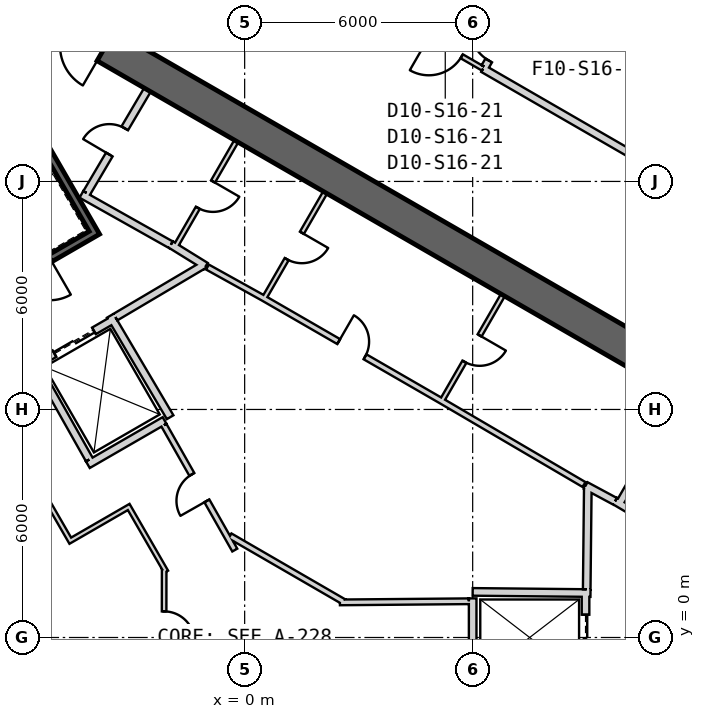
"""IFC4 building model, lengths in metres.
Left out: names, types, materials, properties, quantities, classifications, styles, units other than length and angle.
Written with IfcOpenShell. Run it as: python <this file> out.ifc"""

import sys

from ifc_helpers import new_model, si_unit, direction, frame, frame_2d, origin, place, context, subcontext, project, spatial, rectangle, extrude, element, fill, save


model = new_model("IFC4")
c1 = context("Model", 3, precision=1e-05, world=origin(), true_north=direction((0.0, 1.0)))
c2 = subcontext(c1, "Body", "Model", "MODEL_VIEW")
j1 = project(units=[si_unit("LENGTHUNIT", "METRE"), si_unit("PLANEANGLEUNIT", "RADIAN")], contexts=[c1])
p1 = place(None, origin())
s1 = spatial("IfcSite", under=j1, at=p1, CompositionType="ELEMENT")
p2 = place(p1, origin())
s2 = spatial("IfcBuilding", under=s1, at=p2, CompositionType="ELEMENT")
p3 = place(p2, frame((0.0, 0.0, 253.2)))
s3 = spatial("IfcBuildingStorey", under=s2, at=p3, CompositionType="ELEMENT", Elevation=253.2)
p4 = place(p3, frame((19.475, 2.208, 0.0), z_axis=(0.0, 0.0, 1.0), x_axis=(-0.866028369851, 0.499994862586, 0.0)))
e1 = element("IfcWall", 1, at=p4, inside=s3, PredefinedType="SHEAR", context=c2, shape_type="SweptSolid", body=[
    extrude(rectangle(XDim=31.523, YDim=0.9, at=frame_2d((15.762, 0.0))), origin(), (0.0, 0.0, 1.0), 4.0),
])
p5 = place(p4, frame((7.062, 0.0, 0.0)))
e2 = element("IfcOpeningElement", 2, at=p5, cuts=e1, PredefinedType="OPENING", context=c2, shape_type="SweptSolid", body=[
    extrude(rectangle(XDim=1.2, YDim=2.4, at=frame_2d((0.6, 1.2))), frame((0.0, 0.46, 0.0), z_axis=(0.0, -1.0, 0.0), x_axis=(1.0, 0.0, 0.0)), (0.0, 0.0, 1.0), 0.92),
])
p6 = place(p4, frame((3.612, 0.0, 0.0)))
e3 = element("IfcOpeningElement", 3, at=p6, cuts=e1, PredefinedType="OPENING", context=c2, shape_type="SweptSolid", body=[
    extrude(rectangle(XDim=1.2, YDim=2.4, at=frame_2d((0.6, 1.2))), frame((0.0, 0.46, 0.0), z_axis=(0.0, -1.0, 0.0), x_axis=(1.0, 0.0, 0.0)), (0.0, 0.0, 1.0), 0.92),
])
p7 = place(p4, frame((26.712, 0.0, 0.0)))
e4 = element("IfcOpeningElement", 4, at=p7, cuts=e1, PredefinedType="OPENING", context=c2, shape_type="SweptSolid", body=[
    extrude(rectangle(XDim=1.2, YDim=2.4, at=frame_2d((0.6, 1.2))), frame((0.0, 0.46, 0.0), z_axis=(0.0, -1.0, 0.0), x_axis=(1.0, 0.0, 0.0)), (0.0, 0.0, 1.0), 0.92),
])
p8 = place(p3, frame((9.847, 3.495, 0.0), z_axis=(0.0, 0.0, 1.0), x_axis=(0.499984717929, 0.866034226713, 0.0)))
e5 = element("IfcWall", 5, at=p8, inside=s3, PredefinedType="PLUMBINGWALL", context=c2, shape_type="SweptSolid", body=[
    extrude(rectangle(XDim=3.25, YDim=0.2, at=frame_2d((1.625, 0.0))), origin(), (0.0, 0.0, 1.0), 3.7),
])
p9 = place(p3, frame((12.073, 2.211, 0.0), z_axis=(0.0, 0.0, 1.0), x_axis=(-0.860414880418, 0.509594185166, 0.0)))
e6 = element("IfcWall", 6, at=p9, inside=s3, PredefinedType="PLUMBINGWALL", context=c2, shape_type="SweptSolid", body=[
    extrude(rectangle(XDim=2.7, YDim=0.2, at=frame_2d((1.35, 0.0))), origin(), (0.0, 0.0, 1.0), 3.7),
])
p10 = place(p3, frame((8.97, 1.2, 0.0), z_axis=(0.0, 0.0, 1.0), x_axis=(0.0, -1.0, 0.0)))
e7 = element("IfcWall", 7, at=p10, inside=s3, PredefinedType="PLUMBINGWALL", context=c2, shape_type="SweptSolid", body=[
    extrude(rectangle(XDim=2.4, YDim=0.2, at=frame_2d((1.2, 0.0))), origin(), (0.0, 0.0, 1.0), 3.7),
])
p11 = place(p10, frame((0.6, 0.0, 0.0)))
e8 = element("IfcOpeningElement", 8, at=p11, cuts=e7, PredefinedType="OPENING", context=c2, shape_type="SweptSolid", body=[
    extrude(rectangle(XDim=1.2, YDim=2.4, at=frame_2d((0.6, 1.2))), frame((0.0, 0.11, 0.0), z_axis=(0.0, -1.0, 0.0), x_axis=(1.0, 0.0, 0.0)), (0.0, 0.0, 1.0), 0.22),
])
p12 = place(p3, frame((6.0, 1.2, 0.0), z_axis=(0.0, 0.0, 1.0), x_axis=(0.999949988, -0.010001074852, 0.0)))
e9 = element("IfcWall", 9, at=p12, inside=s3, PredefinedType="PLUMBINGWALL", context=c2, shape_type="SweptSolid", body=[
    extrude(rectangle(XDim=3.1, YDim=0.2, at=frame_2d((1.55, 0.0))), origin(), (0.0, 0.0, 1.0), 3.7),
])
p13 = place(p3, frame((6.0, -1.1, 0.0), z_axis=(0.0, 0.0, 1.0), x_axis=(0.0, 1.0, 0.0)))
e10 = element("IfcWall", 10, at=p13, inside=s3, PredefinedType="PLUMBINGWALL", context=c2, shape_type="SweptSolid", body=[
    extrude(rectangle(XDim=2.13, YDim=0.2, at=frame_2d((1.065, 0.0))), origin(), (0.0, 0.0, 1.0), 3.7),
])
p14 = place(p3, frame((-7.854, 17.405, -0.3), z_axis=(0.0, 0.0, 1.0), x_axis=(0.499997992926, -0.866026562566, 0.0)))
e11 = element("IfcWall", 11, at=p14, inside=s3, PredefinedType="SHEAR", context=c2, shape_type="SweptSolid", body=[
    extrude(rectangle(XDim=7.9, YDim=0.2, at=frame_2d((3.95, 0.0))), origin(), (0.0, 0.0, 1.0), 4.0),
])
p15 = place(p3, frame((-7.159, 8.8, -0.3), z_axis=(0.0, 0.0, 1.0), x_axis=(0.866047807691, 0.499961193289, 0.0)))
e12 = element("IfcWall", 12, at=p15, inside=s3, PredefinedType="SHEAR", context=c2, shape_type="SweptSolid", body=[
    extrude(rectangle(XDim=3.6, YDim=0.2, at=frame_2d((1.8, 0.0))), origin(), (0.0, 0.0, 1.0), 4.0),
])
p16 = place(p15, frame((1.25, 0.0, 0.3)))
e13 = element("IfcOpeningElement", 13, at=p16, cuts=e12, PredefinedType="OPENING", context=c2, shape_type="SweptSolid", body=[
    extrude(rectangle(XDim=1.1, YDim=2.1, at=frame_2d((0.55, 1.05))), frame((0.0, 0.11, 0.0), z_axis=(0.0, -1.0, 0.0), x_axis=(1.0, 0.0, 0.0)), (0.0, 0.0, 1.0), 0.22),
])
p17 = place(p3, frame((-5.524, 7.168, 0.0), z_axis=(0.0, 0.0, 1.0), x_axis=(0.866024647952, 0.500001309137, 0.0)))
e14 = element("IfcWall", 14, at=p17, inside=s3, PredefinedType="PLUMBINGWALL", context=c2, shape_type="SweptSolid", body=[
    extrude(rectangle(XDim=2.4, YDim=0.2, at=frame_2d((1.2, 0.0))), origin(), (0.0, 0.0, 1.0), 3.7),
])
p18 = place(p17, frame((0.6, 0.0, 0.0)))
e15 = element("IfcOpeningElement", 15, at=p18, cuts=e14, PredefinedType="OPENING", context=c2, shape_type="SweptSolid", body=[
    extrude(rectangle(XDim=1.2, YDim=2.4, at=frame_2d((0.6, 1.2))), frame((0.0, 0.11, 0.0), z_axis=(0.0, -1.0, 0.0), x_axis=(1.0, 0.0, 0.0)), (0.0, 0.0, 1.0), 0.22),
])
p19 = place(p3, frame((-3.538, 8.465, 0.0), z_axis=(0.0, 0.0, 1.0), x_axis=(0.508647062354, -0.860975125052, 0.0)))
e16 = element("IfcWall", 16, at=p19, inside=s3, PredefinedType="PLUMBINGWALL", context=c2, shape_type="SweptSolid", body=[
    extrude(rectangle(XDim=3.1, YDim=0.2, at=frame_2d((1.55, 0.0))), origin(), (0.0, 0.0, 1.0), 3.7),
])
p20 = place(p3, frame((-2.108, 5.711, 0.0), z_axis=(0.0, 0.0, 1.0), x_axis=(-0.866009305107, -0.50002788269, 0.0)))
e17 = element("IfcWall", 17, at=p20, inside=s3, PredefinedType="PLUMBINGWALL", context=c2, shape_type="SweptSolid", body=[
    extrude(rectangle(XDim=2.329, YDim=0.2, at=frame_2d((1.165, 0.0))), origin(), (0.0, 0.0, 1.0), 3.7),
])
p21 = place(p3, frame((-5.562, 7.296, 0.0), z_axis=(0.0, 0.0, 1.0), x_axis=(0.49134651263, -0.870964180966, 0.0)))
e18 = element("IfcWall", 18, at=p21, inside=s3, PredefinedType="PLUMBINGWALL", context=c2, shape_type="SweptSolid", body=[
    extrude(rectangle(XDim=3.0, YDim=0.2, at=frame_2d((1.5, 0.0))), origin(), (0.0, 0.0, 1.0), 3.7),
])
p22 = place(p3, frame((6.795, 9.01, 0.0), z_axis=(0.0, 0.0, 1.0), x_axis=(-0.499984717929, -0.866034226713, 0.0)))
e19 = element("IfcWall", 19, at=p22, inside=s3, PredefinedType="PARTITIONING", context=c2, shape_type="SweptSolid", body=[
    extrude(rectangle(XDim=3.25, YDim=0.12, at=frame_2d((1.625, 0.0))), origin(), (0.0, 0.0, 1.0), 3.7),
])
p23 = place(p22, frame((1.225, 0.0, 0.0)))
e20 = element("IfcOpeningElement", 20, at=p23, cuts=e19, PredefinedType="OPENING", context=c2, shape_type="SweptSolid", body=[
    extrude(rectangle(XDim=0.8, YDim=2.1, at=frame_2d((0.4, 1.05))), frame((0.0, 0.07, 0.0), z_axis=(0.0, -1.0, 0.0), x_axis=(1.0, 0.0, 0.0)), (0.0, 0.0, 1.0), 0.14),
])
p24 = place(p3, frame((8.974, 3.999, 0.0), z_axis=(0.0, 0.0, 1.0), x_axis=(0.880917147855, -0.473270513147, 0.0)))
e21 = element("IfcWall", 21, at=p24, inside=s3, PredefinedType="PARTITIONING", context=c2, shape_type="SweptSolid", body=[
    extrude(rectangle(XDim=0.878, YDim=0.2, at=frame_2d((0.439, 0.0))), origin(), (0.0, 0.0, 1.0), 3.7),
])
p25 = place(p3, frame((8.931, 4.025, 0.0), z_axis=(0.0, 0.0, 1.0), x_axis=(-0.862666884027, 0.505772525157, 0.0)))
e22 = element("IfcWall", 22, at=p25, inside=s3, PredefinedType="PLUMBINGWALL", context=c2, shape_type="SweptSolid", body=[
    extrude(rectangle(XDim=4.372, YDim=0.15, at=frame_2d((2.186, 0.0))), origin(), (0.0, 0.0, 1.0), 3.7),
])
p26 = place(p3, frame((2.119, 11.709, 0.0), z_axis=(0.0, 0.0, 1.0), x_axis=(-0.500017246033, -0.866015446554, 0.0)))
e23 = element("IfcWall", 23, at=p26, inside=s3, PredefinedType="PARTITIONING", context=c2, shape_type="SweptSolid", body=[
    extrude(rectangle(XDim=3.25, YDim=0.12, at=frame_2d((1.625, 0.0))), origin(), (0.0, 0.0, 1.0), 3.7),
])
p27 = place(p26, frame((1.225, 0.0, 0.0)))
e24 = element("IfcOpeningElement", 24, at=p27, cuts=e23, PredefinedType="OPENING", context=c2, shape_type="SweptSolid", body=[
    extrude(rectangle(XDim=0.8, YDim=2.1, at=frame_2d((0.4, 1.05))), frame((0.0, 0.07, 0.0), z_axis=(0.0, -1.0, 0.0), x_axis=(1.0, 0.0, 0.0)), (0.0, 0.0, 1.0), 0.14),
])
p28 = place(p3, frame((5.159, 6.236, 0.0), z_axis=(0.0, 0.0, 1.0), x_axis=(-0.866028230842, 0.499995103361, 0.0)))
e25 = element("IfcWall", 25, at=p28, inside=s3, PredefinedType="PLUMBINGWALL", context=c2, shape_type="SweptSolid", body=[
    extrude(rectangle(XDim=5.4, YDim=0.15, at=frame_2d((2.7, 0.0))), origin(), (0.0, 0.0, 1.0), 3.7),
])
p29 = place(p28, frame((2.3, 0.0, 0.0)))
e26 = element("IfcOpeningElement", 26, at=p29, cuts=e25, PredefinedType="OPENING", context=c2, shape_type="SweptSolid", body=[
    extrude(rectangle(XDim=0.8, YDim=2.1, at=frame_2d((0.4, 1.05))), frame((0.0, 0.085, 0.0), z_axis=(0.0, -1.0, 0.0), x_axis=(1.0, 0.0, 0.0)), (0.0, 0.0, 1.0), 0.17),
])
p30 = place(p3, frame((-0.22, 13.06, 0.0), z_axis=(0.0, 0.0, 1.0), x_axis=(-0.499984717929, -0.866034226713, 0.0)))
e27 = element("IfcWall", 27, at=p30, inside=s3, PredefinedType="PARTITIONING", context=c2, shape_type="SweptSolid", body=[
    extrude(rectangle(XDim=3.25, YDim=0.12, at=frame_2d((1.625, 0.0))), origin(), (0.0, 0.0, 1.0), 3.7),
])
p31 = place(p30, frame((1.225, 0.0, 0.0)))
e28 = element("IfcOpeningElement", 28, at=p31, cuts=e27, PredefinedType="OPENING", context=c2, shape_type="SweptSolid", body=[
    extrude(rectangle(XDim=0.8, YDim=2.1, at=frame_2d((0.4, 1.05))), frame((0.0, 0.07, 0.0), z_axis=(0.0, -1.0, 0.0), x_axis=(1.0, 0.0, 0.0)), (0.0, 0.0, 1.0), 0.14),
])
p32 = place(p3, frame((-1.941, 10.339, 0.0), z_axis=(0.0, 0.0, 1.0), x_axis=(0.850216889117, -0.526432561171, 0.0)))
e29 = element("IfcWall", 29, at=p32, inside=s3, PredefinedType="PARTITIONING", context=c2, shape_type="SweptSolid", body=[
    extrude(rectangle(XDim=1.078, YDim=0.2, at=frame_2d((0.539, 0.0))), origin(), (0.0, 0.0, 1.0), 3.7),
])
p33 = place(p3, frame((0.483, 8.936, 0.0), z_axis=(0.0, 0.0, 1.0), x_axis=(-0.874315691004, 0.485357674776, 0.0)))
e30 = element("IfcWall", 30, at=p33, inside=s3, PredefinedType="PLUMBINGWALL", context=c2, shape_type="SweptSolid", body=[
    extrude(rectangle(XDim=1.671, YDim=0.15, at=frame_2d((0.836, 0.0))), origin(), (0.0, 0.0, 1.0), 3.7),
])
p34 = place(p3, frame((-4.296, 11.659, 0.0), z_axis=(0.0, 0.0, 1.0), x_axis=(0.871534483978, -0.490334215854, 0.0)))
e31 = element("IfcWall", 31, at=p34, inside=s3, PredefinedType="PARTITIONING", context=c2, shape_type="SweptSolid", body=[
    extrude(rectangle(XDim=2.7, YDim=0.2, at=frame_2d((1.35, 0.0))), origin(), (0.0, 0.0, 1.0), 3.7),
])
p35 = place(p3, frame((-2.558, 14.409, 0.0), z_axis=(0.0, 0.0, 1.0), x_axis=(-0.508018930956, -0.861345903683, 0.0)))
e32 = element("IfcWall", 32, at=p35, inside=s3, PredefinedType="PARTITIONING", context=c2, shape_type="SweptSolid", body=[
    extrude(rectangle(XDim=3.15, YDim=0.2, at=frame_2d((1.575, 0.0))), origin(), (0.0, 0.0, 1.0), 3.7),
])
p36 = place(p35, frame((1.175, 0.0, 0.0)))
e33 = element("IfcOpeningElement", 33, at=p36, cuts=e32, PredefinedType="OPENING", context=c2, shape_type="SweptSolid", body=[
    extrude(rectangle(XDim=0.8, YDim=2.1, at=frame_2d((0.4, 1.05))), frame((0.0, 0.11, 0.0), z_axis=(0.0, -1.0, 0.0), x_axis=(1.0, 0.0, 0.0)), (0.0, 0.0, 1.0), 0.22),
])
p37 = place(p3, frame((9.001, 1.27, 0.0), z_axis=(0.0, 0.0, 1.0), x_axis=(0.01074821465, 0.999942236273, 0.0)))
e34 = element("IfcWall", 34, at=p37, inside=s3, PredefinedType="PARTITIONING", context=c2, shape_type="SweptSolid", body=[
    extrude(rectangle(XDim=2.726, YDim=0.2, at=frame_2d((1.363, 0.0))), origin(), (0.0, 0.0, 1.0), 3.7),
])
p38 = place(p3, frame((-1.056, 9.818, 0.0), z_axis=(0.0, 0.0, 1.0), x_axis=(-0.860599924646, -0.509281621207, 0.0)))
e35 = element("IfcWall", 35, at=p38, inside=s3, PredefinedType="PARTITIONING", context=c2, shape_type="SweptSolid", body=[
    extrude(rectangle(XDim=2.725, YDim=0.2, at=frame_2d((1.362, 0.0))), origin(), (0.0, 0.0, 1.0), 3.7),
])
p39 = place(p3, frame((2.507, 0.924, 0.0), z_axis=(0.0, 0.0, 1.0), x_axis=(0.999961473465, 0.008777903278, 0.0)))
e36 = element("IfcWall", 36, at=p39, inside=s3, PredefinedType="PLUMBINGWALL", context=c2, shape_type="SweptSolid", body=[
    extrude(rectangle(XDim=3.393, YDim=0.15, at=frame_2d((1.697, 0.0))), origin(), (0.0, 0.0, 1.0), 3.7),
])
p40 = place(p3, frame((-0.385, 2.673, 0.0), z_axis=(0.0, 0.0, 1.0), x_axis=(0.865415028875, -0.501055713266, 0.0)))
e37 = element("IfcWall", 37, at=p40, inside=s3, PredefinedType="PLUMBINGWALL", context=c2, shape_type="SweptSolid", body=[
    extrude(rectangle(XDim=3.465, YDim=0.15, at=frame_2d((1.732, 0.0))), origin(), (0.0, 0.0, 1.0), 3.7),
])
p41 = place(p3, frame((-2.124, 5.586, 0.0), z_axis=(0.0, 0.0, 1.0), x_axis=(0.493408695398, -0.869797596746, 0.0)))
e38 = element("IfcWall", 38, at=p41, inside=s3, PredefinedType="PLUMBINGWALL", context=c2, shape_type="SweptSolid", body=[
    extrude(rectangle(XDim=3.778, YDim=0.15, at=frame_2d((1.889, 0.0))), origin(), (0.0, 0.0, 1.0), 3.7),
])
p42 = place(p41, frame((1.489, 0.0, 0.0)))
e39 = element("IfcOpeningElement", 39, at=p42, cuts=e38, PredefinedType="OPENING", context=c2, shape_type="SweptSolid", body=[
    extrude(rectangle(XDim=0.8, YDim=2.1, at=frame_2d((0.4, 1.05))), frame((0.0, 0.085, 0.0), z_axis=(0.0, -1.0, 0.0), x_axis=(1.0, 0.0, 0.0)), (0.0, 0.0, 1.0), 0.17),
])
p43 = place(p3, frame((-4.558, 2.495, 0.0), z_axis=(0.0, 0.0, 1.0), x_axis=(-0.499990139034, 0.866031096941, 0.0)))
e40 = element("IfcWall", 40, at=p43, inside=s3, PredefinedType="PARTITIONING", context=c2, shape_type="SweptSolid", body=[
    extrude(rectangle(XDim=3.0, YDim=0.12, at=frame_2d((1.5, 0.0))), origin(), (0.0, 0.0, 1.0), 3.7),
])
p44 = place(p3, frame((-2.999, 3.465, 0.0), z_axis=(0.0, 0.0, 1.0), x_axis=(-0.866059624469, -0.499940723351, 0.0)))
e41 = element("IfcWall", 41, at=p44, inside=s3, PredefinedType="PARTITIONING", context=c2, shape_type="SweptSolid", body=[
    extrude(rectangle(XDim=1.775, YDim=0.12, at=frame_2d((0.888, 0.0))), origin(), (0.0, 0.0, 1.0), 3.7),
])
p45 = place(p3, frame((-2.066, 1.729, 0.0), z_axis=(0.0, 0.0, 1.0), x_axis=(-0.500002807145, 0.866023783073, 0.0)))
e42 = element("IfcWall", 42, at=p45, inside=s3, PredefinedType="PARTITIONING", context=c2, shape_type="SweptSolid", body=[
    extrude(rectangle(XDim=1.91, YDim=0.12, at=frame_2d((0.955, 0.0))), origin(), (0.0, 0.0, 1.0), 3.7),
])
p46 = place(p3, frame((-2.122, -1.706, 0.0), z_axis=(0.0, 0.0, 1.0), x_axis=(0.001253480909, 0.999999214392, 0.0)))
e43 = element("IfcWall", 43, at=p46, inside=s3, PredefinedType="PARTITIONING", context=c2, shape_type="SweptSolid", body=[
    extrude(rectangle(XDim=3.506, YDim=0.12, at=frame_2d((1.753, 0.0))), origin(), (0.0, 0.0, 1.0), 3.7),
])
p47 = place(p46, frame((1.594, 0.0, 0.0)))
e44 = element("IfcOpeningElement", 44, at=p47, cuts=e43, PredefinedType="OPENING", context=c2, shape_type="SweptSolid", body=[
    extrude(rectangle(XDim=0.8, YDim=2.1, at=frame_2d((0.4, 1.05))), frame((0.0, 0.07, 0.0), z_axis=(0.0, -1.0, 0.0), x_axis=(1.0, 0.0, 0.0)), (0.0, 0.0, 1.0), 0.14),
])
p48 = place(p3, frame((6.275, 14.968, 0.0), z_axis=(0.0, 0.0, 1.0), x_axis=(-0.866053019151, 0.499952165731, 0.0)))
e45 = element("IfcWall", 45, at=p48, inside=s3, PredefinedType="PARTITIONING", context=c2, shape_type="SweptSolid", body=[
    extrude(rectangle(XDim=2.3, YDim=0.12, at=frame_2d((1.15, 0.0))), origin(), (0.0, 0.0, 1.0), 3.7),
])
p49 = place(p48, frame((0.65, 0.0, 0.0)))
e46 = element("IfcOpeningElement", 46, at=p49, cuts=e45, PredefinedType="OPENING", context=c2, shape_type="SweptSolid", body=[
    extrude(rectangle(XDim=1.0, YDim=2.1, at=frame_2d((0.5, 1.05))), frame((0.0, 0.07, 0.0), z_axis=(0.0, -1.0, 0.0), x_axis=(1.0, 0.0, 0.0)), (0.0, 0.0, 1.0), 0.14),
])
p50 = place(p3, frame((16.823, 8.878, 0.0), z_axis=(0.0, 0.0, 1.0), x_axis=(-0.866020355572, 0.500008743658, 0.0)))
e47 = element("IfcWall", 47, at=p50, inside=s3, PredefinedType="PARTITIONING", context=c2, shape_type="SweptSolid", body=[
    extrude(rectangle(XDim=12.18, YDim=0.2, at=frame_2d((6.09, 0.0))), origin(), (0.0, 0.0, 1.0), 2.98),
])
p51 = place(p3, frame((6.322, 15.01, 0.0), z_axis=(0.0, 0.0, 1.0), x_axis=(0.500009283198, 0.866020044061, 0.0)))
e48 = element("IfcWall", 48, at=p51, inside=s3, PredefinedType="PARTITIONING", context=c2, shape_type="SweptSolid", body=[
    extrude(rectangle(XDim=9.112, YDim=0.2, at=frame_2d((4.556, 0.0))), origin(), (0.0, 0.0, 1.0), 3.7),
])
p52 = place(p51, frame((0.2, 0.0, 0.0)))
e49 = element("IfcOpeningElement", 49, at=p52, cuts=e48, PredefinedType="OPENING", context=c2, shape_type="SweptSolid", body=[
    extrude(rectangle(XDim=1.0, YDim=2.1, at=frame_2d((0.5, 1.05))), frame((0.0, 0.11, 0.0), z_axis=(0.0, -1.0, 0.0), x_axis=(1.0, 0.0, 0.0)), (0.0, 0.0, 1.0), 0.22),
])
p53 = place(p11, origin())
e50 = element("IfcDoor", 50, at=p53, inside=s3, OperationType="SLIDING_TO_LEFT", PredefinedType="USERDEFINED", context=c2, shape_type="SweptSolid", body=[
    extrude(rectangle(XDim=1.2, YDim=2.4, at=frame_2d((0.6, 1.2))), frame((0.0, 0.025, 0.0), z_axis=(0.0, -1.0, 0.0), x_axis=(1.0, 0.0, 0.0)), (0.0, 0.0, 1.0), 0.05),
])
fill(e8, e50)
p54 = place(p18, origin())
e51 = element("IfcDoor", 51, at=p54, inside=s3, OperationType="SLIDING_TO_LEFT", PredefinedType="USERDEFINED", context=c2, shape_type="SweptSolid", body=[
    extrude(rectangle(XDim=1.2, YDim=2.4, at=frame_2d((0.6, 1.2))), frame((0.0, 0.025, 0.0), z_axis=(0.0, -1.0, 0.0), x_axis=(1.0, 0.0, 0.0)), (0.0, 0.0, 1.0), 0.05),
])
fill(e15, e51)
p55 = place(p42, origin())
e52 = element("IfcDoor", 52, at=p55, inside=s3, OperationType="SINGLE_SWING_RIGHT", PredefinedType="USERDEFINED", context=c2, shape_type="SweptSolid", body=[
    extrude(rectangle(XDim=0.8, YDim=2.1, at=frame_2d((0.4, 1.05))), frame((0.0, 0.025, 0.0), z_axis=(0.0, -1.0, 0.0), x_axis=(1.0, 0.0, 0.0)), (0.0, 0.0, 1.0), 0.05),
])
fill(e39, e52)
p56 = place(p47, origin())
e53 = element("IfcDoor", 53, at=p56, inside=s3, OperationType="SINGLE_SWING_RIGHT", PredefinedType="USERDEFINED", context=c2, shape_type="SweptSolid", body=[
    extrude(rectangle(XDim=0.8, YDim=2.1, at=frame_2d((0.4, 1.05))), frame((0.0, 0.025, 0.0), z_axis=(0.0, -1.0, 0.0), x_axis=(1.0, 0.0, 0.0)), (0.0, 0.0, 1.0), 0.05),
])
fill(e44, e53)
p57 = place(p23, origin())
e54 = element("IfcDoor", 54, at=p57, inside=s3, OperationType="SINGLE_SWING_LEFT", PredefinedType="USERDEFINED", context=c2, shape_type="SweptSolid", body=[
    extrude(rectangle(XDim=0.8, YDim=2.1, at=frame_2d((0.4, 1.05))), frame((0.0, 0.025, 0.0), z_axis=(0.0, -1.0, 0.0), x_axis=(1.0, 0.0, 0.0)), (0.0, 0.0, 1.0), 0.05),
])
fill(e20, e54)
p58 = place(p27, origin())
e55 = element("IfcDoor", 55, at=p58, inside=s3, OperationType="SINGLE_SWING_LEFT", PredefinedType="USERDEFINED", context=c2, shape_type="SweptSolid", body=[
    extrude(rectangle(XDim=0.8, YDim=2.1, at=frame_2d((0.4, 1.05))), frame((0.0, 0.025, 0.0), z_axis=(0.0, -1.0, 0.0), x_axis=(1.0, 0.0, 0.0)), (0.0, 0.0, 1.0), 0.05),
])
fill(e24, e55)
p59 = place(p36, origin())
e56 = element("IfcDoor", 56, at=p59, inside=s3, OperationType="SINGLE_SWING_LEFT", PredefinedType="USERDEFINED", context=c2, shape_type="SweptSolid", body=[
    extrude(rectangle(XDim=0.8, YDim=2.1, at=frame_2d((0.4, 1.05))), frame((0.0, 0.025, 0.0), z_axis=(0.0, -1.0, 0.0), x_axis=(1.0, 0.0, 0.0)), (0.0, 0.0, 1.0), 0.05),
])
fill(e33, e56)
p60 = place(p29, origin())
e57 = element("IfcDoor", 57, at=p60, inside=s3, OperationType="SINGLE_SWING_RIGHT", PredefinedType="USERDEFINED", context=c2, shape_type="SweptSolid", body=[
    extrude(rectangle(XDim=0.8, YDim=2.1, at=frame_2d((0.4, 1.05))), frame((0.0, 0.025, 0.0), z_axis=(0.0, -1.0, 0.0), x_axis=(1.0, 0.0, 0.0)), (0.0, 0.0, 1.0), 0.05),
])
fill(e26, e57)
p61 = place(p49, origin())
e58 = element("IfcDoor", 58, at=p61, inside=s3, OperationType="SINGLE_SWING_RIGHT", PredefinedType="NOTDEFINED", context=c2, shape_type="SweptSolid", body=[
    extrude(rectangle(XDim=1.0, YDim=2.1, at=frame_2d((0.5, 1.05))), frame((0.0, 0.025, 0.0), z_axis=(0.0, -1.0, 0.0), x_axis=(1.0, 0.0, 0.0)), (0.0, 0.0, 1.0), 0.05),
])
fill(e46, e58)
p62 = place(p52, origin())
e59 = element("IfcDoor", 59, at=p62, inside=s3, OperationType="SINGLE_SWING_LEFT", PredefinedType="USERDEFINED", context=c2, shape_type="SweptSolid", body=[
    extrude(rectangle(XDim=1.0, YDim=2.1, at=frame_2d((0.5, 1.05))), frame((0.0, 0.025, 0.0), z_axis=(0.0, -1.0, 0.0), x_axis=(1.0, 0.0, 0.0)), (0.0, 0.0, 1.0), 0.05),
])
fill(e49, e59)
p63 = place(p31, origin())
e60 = element("IfcDoor", 60, at=p63, inside=s3, OperationType="SINGLE_SWING_LEFT", PredefinedType="USERDEFINED", context=c2, shape_type="SweptSolid", body=[
    extrude(rectangle(XDim=0.8, YDim=2.1, at=frame_2d((0.4, 1.05))), frame((0.0, 0.025, 0.0), z_axis=(0.0, -1.0, 0.0), x_axis=(1.0, 0.0, 0.0)), (0.0, 0.0, 1.0), 0.05),
])
fill(e28, e60)
save(model, sys.argv[1])
